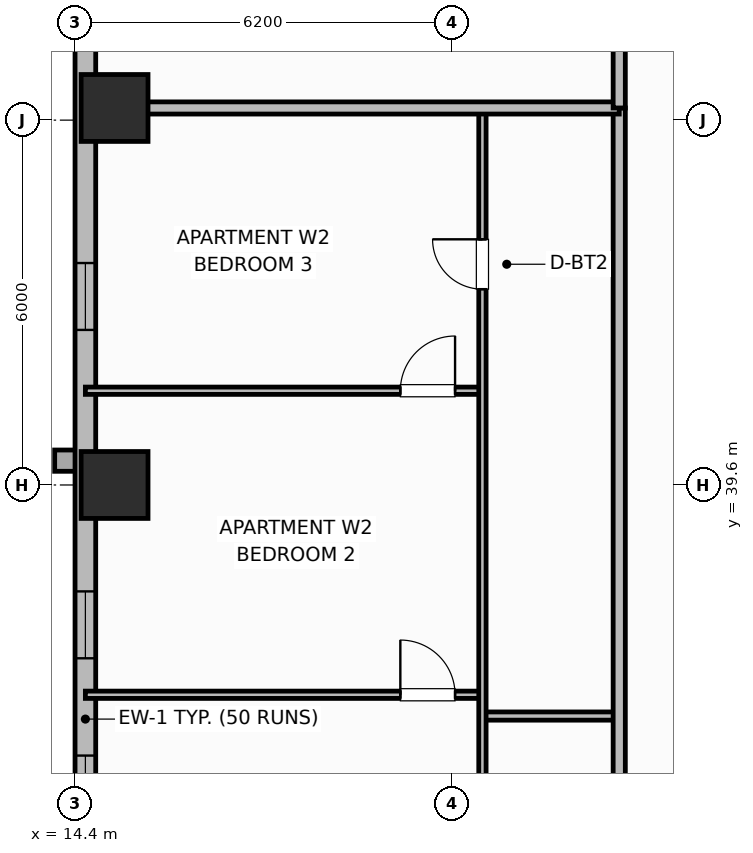
"""IFC4 building model, lengths in metres.
Left out: names, types, materials, properties, quantities, classifications, styles, units other than length and angle.
Written with IfcOpenShell. Run it as: python <this file> out.ifc"""

import sys

from ifc_helpers import new_model, si_unit, direction, frame, frame_2d, origin, origin_2d, place, context, subcontext, project, spatial, rectangle, extrude, element, fill, save


model = new_model("IFC4")
c1 = context("Model", 3, precision=1e-05, world=origin(), true_north=direction((0.0, 1.0)))
c2 = subcontext(c1, "Body", "Model", "MODEL_VIEW")
j1 = project(units=[si_unit("LENGTHUNIT", "METRE"), si_unit("PLANEANGLEUNIT", "RADIAN")], contexts=[c1])
p1 = place(None, origin())
s1 = spatial("IfcSite", under=j1, at=p1, CompositionType="ELEMENT")
p2 = place(p1, origin())
s2 = spatial("IfcBuilding", under=s1, at=p2, CompositionType="ELEMENT")
p3 = place(p2, frame((0.0, 0.0, 117.9)))
s3 = spatial("IfcBuildingStorey", under=s2, at=p3, CompositionType="ELEMENT", Elevation=117.9)
for number, where, z_axis, x_axis in (
    (1, (15.05, 39.6, 0.0), (0.0, 0.0, 1.0), (1.0, 0.0, 0.0)),
    (2, (15.05, 45.8, 0.0), (0.0, 0.0, 1.0), (1.0, 0.0, 0.0)),
):
    element("IfcColumn", number, at=place(p3, frame(where, z_axis=z_axis, x_axis=x_axis)), inside=s3, PredefinedType="COLUMN", context=c2, shape_type="SweptSolid", body=[
        extrude(rectangle(XDim=1.1, YDim=1.1, at=origin_2d()), origin(), (0.0, 0.0, 1.0), 3.7),
    ])
p4 = place(p3, frame((14.57, 47.4, 0.0), z_axis=(0.0, 0.0, 1.0), x_axis=(0.0, -1.0, 0.0)))
e3 = element("IfcWall", 3, at=p4, inside=s3, PredefinedType="SOLIDWALL", context=c2, shape_type="SweptSolid", body=[
    extrude(rectangle(XDim=14.8, YDim=0.34, at=frame_2d((7.4, 0.0))), origin(), (0.0, 0.0, 1.0), 2.7),
])
p5 = place(p4, frame((4.15, 0.0, 0.93)))
e4 = element("IfcOpeningElement", 4, at=p5, cuts=e3, PredefinedType="OPENING", context=c2, shape_type="SweptSolid", body=[
    extrude(rectangle(XDim=1.1, YDim=1.65, at=frame_2d((0.55, 0.825))), frame((0.0, 0.18, 0.0), z_axis=(0.0, -1.0, 0.0), x_axis=(1.0, 0.0, 0.0)), (0.0, 0.0, 1.0), 0.36),
])
p6 = place(p4, frame((9.55, 0.0, 0.93)))
e5 = element("IfcOpeningElement", 5, at=p6, cuts=e3, PredefinedType="OPENING", context=c2, shape_type="SweptSolid", body=[
    extrude(rectangle(XDim=1.1, YDim=1.65, at=frame_2d((0.55, 0.825))), frame((0.0, 0.18, 0.0), z_axis=(0.0, -1.0, 0.0), x_axis=(1.0, 0.0, 0.0)), (0.0, 0.0, 1.0), 0.36),
])
p7 = place(p4, frame((12.25, 0.0, 0.93)))
e6 = element("IfcOpeningElement", 6, at=p7, cuts=e3, PredefinedType="OPENING", context=c2, shape_type="SweptSolid", body=[
    extrude(rectangle(XDim=1.1, YDim=1.65, at=frame_2d((0.55, 0.825))), frame((0.0, 0.18, 0.0), z_axis=(0.0, -1.0, 0.0), x_axis=(1.0, 0.0, 0.0)), (0.0, 0.0, 1.0), 0.36),
])
p8 = place(p3, frame((21.1, 35.8, 0.0), z_axis=(0.0, 0.0, 1.0), x_axis=(1.0, 0.0, 0.0)))
e7 = element("IfcWall", 7, at=p8, inside=s3, PredefinedType="PARTITIONING", context=c2, shape_type="SweptSolid", body=[
    extrude(rectangle(XDim=2.25, YDim=0.135, at=frame_2d((1.125, 0.0))), origin(), (0.0, 0.0, 1.0), 2.53),
])
p9 = place(p3, frame((14.57, 36.15, 0.0), z_axis=(0.0, 0.0, 1.0), x_axis=(1.0, 0.0, 0.0)))
e8 = element("IfcWall", 8, at=p9, inside=s3, PredefinedType="PARTITIONING", context=c2, shape_type="SweptSolid", body=[
    extrude(rectangle(XDim=6.53, YDim=0.12, at=frame_2d((3.265, 0.0))), origin(), (0.0, 0.0, 1.0), 2.53),
])
p10 = place(p9, frame((5.18, 0.0, 0.0)))
e9 = element("IfcOpeningElement", 9, at=p10, cuts=e8, PredefinedType="OPENING", context=c2, shape_type="SweptSolid", body=[
    extrude(rectangle(XDim=0.9, YDim=2.1, at=frame_2d((0.45, 1.05))), frame((0.0, 0.07, 0.0), z_axis=(0.0, -1.0, 0.0), x_axis=(1.0, 0.0, 0.0)), (0.0, 0.0, 1.0), 0.14),
])
p11 = place(p3, frame((14.57, 41.15, 0.0), z_axis=(0.0, 0.0, 1.0), x_axis=(1.0, 0.0, 0.0)))
e10 = element("IfcWall", 10, at=p11, inside=s3, PredefinedType="PARTITIONING", context=c2, shape_type="SweptSolid", body=[
    extrude(rectangle(XDim=6.53, YDim=0.12, at=frame_2d((3.265, 0.0))), origin(), (0.0, 0.0, 1.0), 2.53),
])
p12 = place(p11, frame((5.18, 0.0, 0.0)))
e11 = element("IfcOpeningElement", 11, at=p12, cuts=e10, PredefinedType="OPENING", context=c2, shape_type="SweptSolid", body=[
    extrude(rectangle(XDim=0.9, YDim=2.1, at=frame_2d((0.45, 1.05))), frame((0.0, 0.07, 0.0), z_axis=(0.0, -1.0, 0.0), x_axis=(1.0, 0.0, 0.0)), (0.0, 0.0, 1.0), 0.14),
])
p13 = place(p3, frame((21.1, 26.64, 0.0), z_axis=(0.0, 0.0, 1.0), x_axis=(0.0, 1.0, 0.0)))
e12 = element("IfcWall", 12, at=p13, inside=s3, PredefinedType="PARTITIONING", context=c2, shape_type="SweptSolid", body=[
    extrude(rectangle(XDim=19.12, YDim=0.12, at=frame_2d((9.56, 0.0))), origin(), (0.0, 0.0, 1.0), 2.53),
])
p14 = place(p13, frame((2.81, 0.0, 0.0)))
e13 = element("IfcOpeningElement", 13, at=p14, cuts=e12, PredefinedType="OPENING", context=c2, shape_type="SweptSolid", body=[
    extrude(rectangle(XDim=0.9, YDim=2.1, at=frame_2d((0.45, 1.05))), frame((0.0, 0.07, 0.0), z_axis=(0.0, -1.0, 0.0), x_axis=(1.0, 0.0, 0.0)), (0.0, 0.0, 1.0), 0.14),
])
p15 = place(p13, frame((16.18, 0.0, 0.0)))
e14 = element("IfcOpeningElement", 14, at=p15, cuts=e12, PredefinedType="OPENING", context=c2, shape_type="SweptSolid", body=[
    extrude(rectangle(XDim=0.82, YDim=2.08, at=frame_2d((0.41, 1.04))), frame((0.0, 0.07, 0.0), z_axis=(0.0, -1.0, 0.0), x_axis=(1.0, 0.0, 0.0)), (0.0, 0.0, 1.0), 0.14),
])
p16 = place(p3, frame((23.35, 10.6, 0.0), z_axis=(0.0, 0.0, 1.0), x_axis=(0.0, 1.0, 0.0)))
e15 = element("IfcWall", 15, at=p16, inside=s3, PredefinedType="PARTITIONING", context=c2, shape_type="SweptSolid", body=[
    extrude(rectangle(XDim=35.2, YDim=0.2, at=frame_2d((17.6, 0.0))), origin(), (0.0, 0.0, 1.0), 2.53),
])
p17 = place(p16, frame((2.65, 0.0, 0.0)))
e16 = element("IfcOpeningElement", 16, at=p17, cuts=e15, PredefinedType="OPENING", context=c2, shape_type="SweptSolid", body=[
    extrude(rectangle(XDim=1.0, YDim=2.15, at=frame_2d((0.5, 1.075))), frame((0.0, 0.11, 0.0), z_axis=(0.0, -1.0, 0.0), x_axis=(1.0, 0.0, 0.0)), (0.0, 0.0, 1.0), 0.22),
])
p18 = place(p16, frame((19.95, 0.0, 0.0)))
e17 = element("IfcOpeningElement", 17, at=p18, cuts=e15, PredefinedType="OPENING", context=c2, shape_type="SweptSolid", body=[
    extrude(rectangle(XDim=1.0, YDim=2.15, at=frame_2d((0.5, 1.075))), frame((0.0, 0.11, 0.0), z_axis=(0.0, -1.0, 0.0), x_axis=(1.0, 0.0, 0.0)), (0.0, 0.0, 1.0), 0.22),
])
p19 = place(p3, frame((14.99, 45.8, 0.0), z_axis=(0.0, 0.0, 1.0), x_axis=(1.0, 0.0, 0.0)))
e18 = element("IfcWall", 18, at=p19, inside=s3, PredefinedType="PARTITIONING", context=c2, shape_type="SweptSolid", body=[
    extrude(rectangle(XDim=8.36, YDim=0.2, at=frame_2d((4.18, 0.0))), origin(), (0.0, 0.0, 1.0), 2.53),
])
p20 = place(p3, frame((23.35, 45.8, 0.0), z_axis=(0.0, 0.0, 1.0), x_axis=(0.0, 1.0, 0.0)))
e19 = element("IfcWall", 19, at=p20, inside=s3, PredefinedType="PARTITIONING", context=c2, shape_type="SweptSolid", body=[
    extrude(rectangle(XDim=5.63, YDim=0.2, at=frame_2d((2.815, 0.0))), origin(), (0.0, 0.0, 1.0), 2.53),
])
p21 = place(p5, origin())
e20 = element("IfcWindow", 20, at=p21, inside=s3, PartitioningType="SINGLE_PANEL", PredefinedType="WINDOW", context=c2, shape_type="SweptSolid", body=[
    extrude(rectangle(XDim=1.1, YDim=1.65, at=frame_2d((0.55, 0.825))), frame((0.0, 0.03, 0.0), z_axis=(0.0, -1.0, 0.0), x_axis=(1.0, 0.0, 0.0)), (0.0, 0.0, 1.0), 0.06),
])
fill(e4, e20)
p22 = place(p6, origin())
e21 = element("IfcWindow", 21, at=p22, inside=s3, PartitioningType="SINGLE_PANEL", PredefinedType="WINDOW", context=c2, shape_type="SweptSolid", body=[
    extrude(rectangle(XDim=1.1, YDim=1.65, at=frame_2d((0.55, 0.825))), frame((0.0, 0.03, 0.0), z_axis=(0.0, -1.0, 0.0), x_axis=(1.0, 0.0, 0.0)), (0.0, 0.0, 1.0), 0.06),
])
fill(e5, e21)
p23 = place(p7, origin())
e22 = element("IfcWindow", 22, at=p23, inside=s3, PartitioningType="SINGLE_PANEL", PredefinedType="WINDOW", context=c2, shape_type="SweptSolid", body=[
    extrude(rectangle(XDim=1.1, YDim=1.65, at=frame_2d((0.55, 0.825))), frame((0.0, 0.03, 0.0), z_axis=(0.0, -1.0, 0.0), x_axis=(1.0, 0.0, 0.0)), (0.0, 0.0, 1.0), 0.06),
])
fill(e6, e22)
p24 = place(p10, origin())
e23 = element("IfcDoor", 23, at=p24, inside=s3, OperationType="SINGLE_SWING_LEFT", PredefinedType="DOOR", context=c2, shape_type="SweptSolid", body=[
    extrude(rectangle(XDim=0.9, YDim=2.1, at=frame_2d((0.45, 1.05))), frame((0.0, 0.025, 0.0), z_axis=(0.0, -1.0, 0.0), x_axis=(1.0, 0.0, 0.0)), (0.0, 0.0, 1.0), 0.05),
])
fill(e9, e23)
p25 = place(p12, origin())
e24 = element("IfcDoor", 24, at=p25, inside=s3, OperationType="SINGLE_SWING_RIGHT", PredefinedType="DOOR", context=c2, shape_type="SweptSolid", body=[
    extrude(rectangle(XDim=0.9, YDim=2.1, at=frame_2d((0.45, 1.05))), frame((0.0, 0.025, 0.0), z_axis=(0.0, -1.0, 0.0), x_axis=(1.0, 0.0, 0.0)), (0.0, 0.0, 1.0), 0.05),
])
fill(e11, e24)
p26 = place(p15, origin())
e25 = element("IfcDoor", 25, at=p26, inside=s3, OperationType="SINGLE_SWING_RIGHT", PredefinedType="DOOR", context=c2, shape_type="SweptSolid", body=[
    extrude(rectangle(XDim=0.82, YDim=2.08, at=frame_2d((0.41, 1.04))), frame((0.0, 0.025, 0.0), z_axis=(0.0, -1.0, 0.0), x_axis=(1.0, 0.0, 0.0)), (0.0, 0.0, 1.0), 0.05),
])
fill(e14, e25)
save(model, sys.argv[1])
